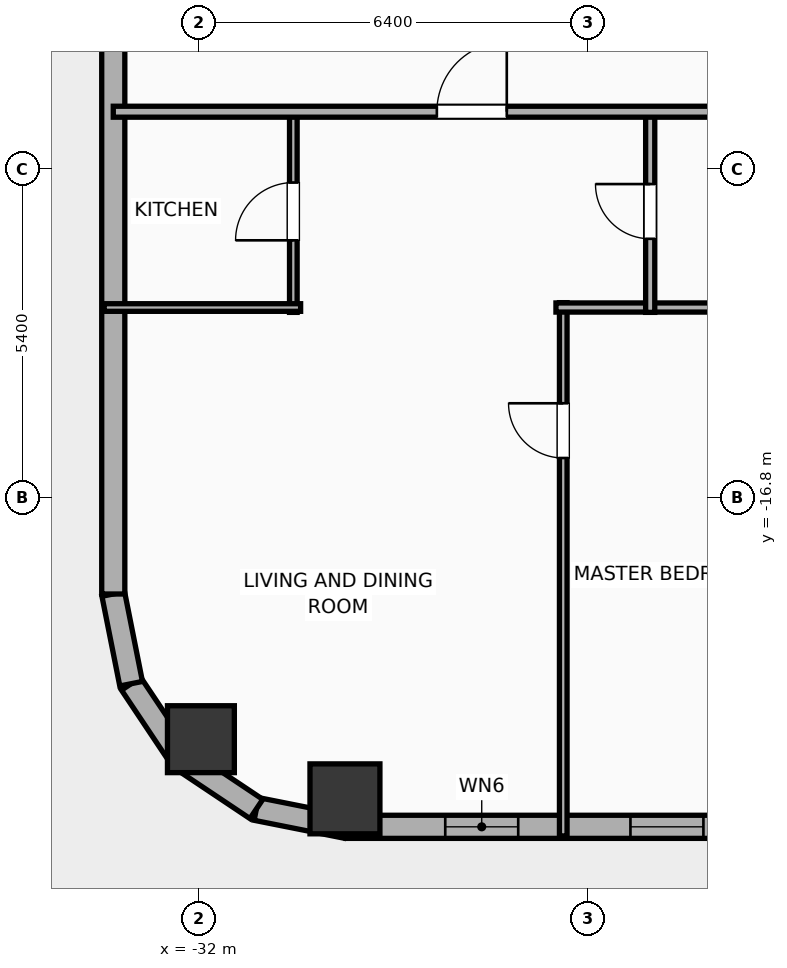
"""IFC4 building model, lengths in metres.
Left out: names, types, materials, properties, quantities, classifications, styles, units other than length and angle.
Written with IfcOpenShell. Run it as: python <this file> out.ifc"""

import sys

from ifc_helpers import new_model, si_unit, direction, frame, frame_2d, origin, origin_2d, place, context, subcontext, project, spatial, rectangle, hollow_rectangle, hollow_circle, extrude, element, fill, save


model = new_model("IFC4")
c1 = context("Model", 3, precision=1e-05, world=origin(), true_north=direction((0.0, 1.0)))
c2 = subcontext(c1, "Body", "Model", "MODEL_VIEW")
j1 = project(units=[si_unit("LENGTHUNIT", "METRE"), si_unit("PLANEANGLEUNIT", "RADIAN")], contexts=[c1])
p1 = place(None, origin())
s1 = spatial("IfcSite", under=j1, at=p1, CompositionType="ELEMENT")
p2 = place(p1, origin())
s2 = spatial("IfcBuilding", under=s1, at=p2, CompositionType="ELEMENT")
p3 = place(p2, frame((0.0, 0.0, 26.0)))
s3 = spatial("IfcBuildingStorey", under=s2, at=p3, CompositionType="ELEMENT", Elevation=26.0)
p4 = place(p3, frame((-29.6, -21.75, -0.25), z_axis=(0.0, 0.0, 1.0), x_axis=(1.0, 0.0, 0.0)))
e1 = element("IfcColumn", 1, at=p4, inside=s3, PredefinedType="COLUMN", context=c2, shape_type="SweptSolid", body=[
    extrude(hollow_rectangle(XDim=1.15, YDim=1.15, WallThickness=0.04, at=origin_2d()), origin(), (0.0, 0.0, 1.0), 4.15),
])
p5 = place(p3, frame((-31.969, -20.769, -0.25), z_axis=(0.0, 0.0, 1.0), x_axis=(1.0, 0.0, 0.0)))
e2 = element("IfcColumn", 2, at=p5, inside=s3, PredefinedType="COLUMN", context=c2, shape_type="SweptSolid", body=[
    extrude(hollow_circle(Radius=0.55, WallThickness=0.036, at=origin_2d()), origin(), (0.0, 0.0, 1.0), 4.15),
])
p6 = place(p3, frame((22.381, -22.21, 0.0), z_axis=(0.0, 0.0, 1.0), x_axis=(-1.0, 0.0, 0.0)))
e3 = element("IfcWall", 3, at=p6, inside=s3, PredefinedType="ELEMENTEDWALL", context=c2, shape_type="SweptSolid", body=[
    extrude(rectangle(XDim=51.963, YDim=0.38, at=frame_2d((25.981, 0.0))), origin(), (0.0, 0.0, 1.0), 2.54),
])
p7 = place(p6, frame((25.231, 0.0, 0.0)))
e4 = element("IfcOpeningElement", 4, at=p7, cuts=e3, PredefinedType="OPENING", context=c2, shape_type="SweptSolid", body=[
    extrude(rectangle(XDim=1.5, YDim=2.05, at=frame_2d((0.75, 1.025))), frame((0.0, 0.2, 0.0), z_axis=(0.0, -1.0, 0.0), x_axis=(1.0, 0.0, 0.0)), (0.0, 0.0, 1.0), 0.4),
])
p8 = place(p6, frame((6.61, 0.0, 0.75)))
e5 = element("IfcOpeningElement", 5, at=p8, cuts=e3, PredefinedType="OPENING", context=c2, shape_type="SweptSolid", body=[
    extrude(rectangle(XDim=2.4, YDim=1.63, at=frame_2d((1.2, 0.815))), frame((0.0, 0.2, 0.0), z_axis=(0.0, -1.0, 0.0), x_axis=(1.0, 0.0, 0.0)), (0.0, 0.0, 1.0), 0.4),
])
p9 = place(p6, frame((49.132, 0.0, 0.75)))
e6 = element("IfcOpeningElement", 6, at=p9, cuts=e3, PredefinedType="OPENING", context=c2, shape_type="SweptSolid", body=[
    extrude(rectangle(XDim=1.2, YDim=1.63, at=frame_2d((0.6, 0.815))), frame((0.0, 0.2, 0.0), z_axis=(0.0, -1.0, 0.0), x_axis=(1.0, 0.0, 0.0)), (0.0, 0.0, 1.0), 0.4),
])
p10 = place(p6, frame((46.086, 0.0, 0.75)))
e7 = element("IfcOpeningElement", 7, at=p10, cuts=e3, PredefinedType="OPENING", context=c2, shape_type="SweptSolid", body=[
    extrude(rectangle(XDim=1.2, YDim=1.63, at=frame_2d((0.6, 0.815))), frame((0.0, 0.2, 0.0), z_axis=(0.0, -1.0, 0.0), x_axis=(1.0, 0.0, 0.0)), (0.0, 0.0, 1.0), 0.4),
])
p11 = place(p6, frame((42.426, 0.0, 0.75)))
e8 = element("IfcOpeningElement", 8, at=p11, cuts=e3, PredefinedType="OPENING", context=c2, shape_type="SweptSolid", body=[
    extrude(rectangle(XDim=1.2, YDim=1.63, at=frame_2d((0.6, 0.815))), frame((0.0, 0.2, 0.0), z_axis=(0.0, -1.0, 0.0), x_axis=(1.0, 0.0, 0.0)), (0.0, 0.0, 1.0), 0.4),
])
p12 = place(p6, frame((38.286, 0.0, 0.75)))
e9 = element("IfcOpeningElement", 9, at=p12, cuts=e3, PredefinedType="OPENING", context=c2, shape_type="SweptSolid", body=[
    extrude(rectangle(XDim=1.2, YDim=1.63, at=frame_2d((0.6, 0.815))), frame((0.0, 0.2, 0.0), z_axis=(0.0, -1.0, 0.0), x_axis=(1.0, 0.0, 0.0)), (0.0, 0.0, 1.0), 0.4),
])
p13 = place(p6, frame((35.219, 0.0, 0.75)))
e10 = element("IfcOpeningElement", 10, at=p13, cuts=e3, PredefinedType="OPENING", context=c2, shape_type="SweptSolid", body=[
    extrude(rectangle(XDim=1.2, YDim=1.63, at=frame_2d((0.6, 0.815))), frame((0.0, 0.2, 0.0), z_axis=(0.0, -1.0, 0.0), x_axis=(1.0, 0.0, 0.0)), (0.0, 0.0, 1.0), 0.4),
])
p14 = place(p6, frame((32.039, 0.0, 0.75)))
e11 = element("IfcOpeningElement", 11, at=p14, cuts=e3, PredefinedType="OPENING", context=c2, shape_type="SweptSolid", body=[
    extrude(rectangle(XDim=1.2, YDim=1.63, at=frame_2d((0.6, 0.815))), frame((0.0, 0.2, 0.0), z_axis=(0.0, -1.0, 0.0), x_axis=(1.0, 0.0, 0.0)), (0.0, 0.0, 1.0), 0.4),
])
p15 = place(p6, frame((22.686, 0.0, 0.75)))
e12 = element("IfcOpeningElement", 12, at=p15, cuts=e3, PredefinedType="OPENING", context=c2, shape_type="SweptSolid", body=[
    extrude(rectangle(XDim=1.2, YDim=1.63, at=frame_2d((0.6, 0.815))), frame((0.0, 0.2, 0.0), z_axis=(0.0, -1.0, 0.0), x_axis=(1.0, 0.0, 0.0)), (0.0, 0.0, 1.0), 0.4),
])
p16 = place(p6, frame((18.786, 0.0, 0.75)))
e13 = element("IfcOpeningElement", 13, at=p16, cuts=e3, PredefinedType="OPENING", context=c2, shape_type="SweptSolid", body=[
    extrude(rectangle(XDim=1.2, YDim=1.63, at=frame_2d((0.6, 0.815))), frame((0.0, 0.2, 0.0), z_axis=(0.0, -1.0, 0.0), x_axis=(1.0, 0.0, 0.0)), (0.0, 0.0, 1.0), 0.4),
])
p17 = place(p6, frame((14.886, 0.0, 0.75)))
e14 = element("IfcOpeningElement", 14, at=p17, cuts=e3, PredefinedType="OPENING", context=c2, shape_type="SweptSolid", body=[
    extrude(rectangle(XDim=1.2, YDim=1.63, at=frame_2d((0.6, 0.815))), frame((0.0, 0.2, 0.0), z_axis=(0.0, -1.0, 0.0), x_axis=(1.0, 0.0, 0.0)), (0.0, 0.0, 1.0), 0.4),
])
p18 = place(p6, frame((11.826, 0.0, 0.75)))
e15 = element("IfcOpeningElement", 15, at=p18, cuts=e3, PredefinedType="OPENING", context=c2, shape_type="SweptSolid", body=[
    extrude(rectangle(XDim=1.2, YDim=1.63, at=frame_2d((0.6, 0.815))), frame((0.0, 0.2, 0.0), z_axis=(0.0, -1.0, 0.0), x_axis=(1.0, 0.0, 0.0)), (0.0, 0.0, 1.0), 0.4),
])
p19 = place(p6, frame((2.836, 0.0, 0.75)))
e16 = element("IfcOpeningElement", 16, at=p19, cuts=e3, PredefinedType="OPENING", context=c2, shape_type="SweptSolid", body=[
    extrude(rectangle(XDim=1.2, YDim=1.63, at=frame_2d((0.6, 0.815))), frame((0.0, 0.2, 0.0), z_axis=(0.0, -1.0, 0.0), x_axis=(1.0, 0.0, 0.0)), (0.0, 0.0, 1.0), 0.4),
])
p20 = place(p3, frame((-29.581, -22.21, 0.0), z_axis=(0.0, 0.0, 1.0), x_axis=(-0.980786132421, 0.195086038585, 0.0)))
e17 = element("IfcWall", 17, at=p20, inside=s3, PredefinedType="ELEMENTEDWALL", context=c2, shape_type="SweptSolid", body=[
    extrude(rectangle(XDim=1.504, YDim=0.38, at=frame_2d((0.752, 0.0))), origin(), (0.0, 0.0, 1.0), 2.54),
])
p21 = place(p3, frame((-31.057, -21.917, 0.0), z_axis=(0.0, 0.0, 1.0), x_axis=(-0.831442848281, 0.555610286119, 0.0)))
e18 = element("IfcWall", 18, at=p21, inside=s3, PredefinedType="ELEMENTEDWALL", context=c2, shape_type="SweptSolid", body=[
    extrude(rectangle(XDim=1.485, YDim=0.38, at=frame_2d((0.743, 0.0))), origin(), (0.0, 0.0, 1.0), 2.54),
])
p22 = place(p3, frame((-32.292, -21.091, 0.0), z_axis=(0.0, 0.0, 1.0), x_axis=(-0.555572577804, 0.831468045563, 0.0)))
e19 = element("IfcWall", 19, at=p22, inside=s3, PredefinedType="ELEMENTEDWALL", context=c2, shape_type="SweptSolid", body=[
    extrude(rectangle(XDim=1.485, YDim=0.38, at=frame_2d((0.742, 0.0))), origin(), (0.0, 0.0, 1.0), 3.65),
])
p23 = place(p3, frame((-33.116, -19.857, 0.0), z_axis=(0.0, 0.0, 1.0), x_axis=(-0.195086038585, 0.980786132421, 0.0)))
e20 = element("IfcWall", 20, at=p23, inside=s3, PredefinedType="ELEMENTEDWALL", context=c2, shape_type="SweptSolid", body=[
    extrude(rectangle(XDim=1.504, YDim=0.38, at=frame_2d((0.752, 0.0))), origin(), (0.0, 0.0, 1.0), 3.65),
])
p24 = place(p3, frame((-33.41, -18.381, 0.0), z_axis=(0.0, 0.0, 1.0), x_axis=(0.0, 1.0, 0.0)))
e21 = element("IfcWall", 21, at=p24, inside=s3, PredefinedType="ELEMENTEDWALL", context=c2, shape_type="SweptSolid", body=[
    extrude(rectangle(XDim=36.763, YDim=0.38, at=frame_2d((18.381, 0.0))), origin(), (0.0, 0.0, 1.0), 2.54),
])
p25 = place(p24, frame((33.362, 0.0, 0.75)))
e22 = element("IfcOpeningElement", 22, at=p25, cuts=e21, PredefinedType="OPENING", context=c2, shape_type="SweptSolid", body=[
    extrude(rectangle(XDim=1.2, YDim=1.63, at=frame_2d((0.6, 0.815))), frame((0.0, 0.2, 0.0), z_axis=(0.0, -1.0, 0.0), x_axis=(1.0, 0.0, 0.0)), (0.0, 0.0, 1.0), 0.4),
])
p26 = place(p24, frame((22.301, 0.0, 0.75)))
e23 = element("IfcOpeningElement", 23, at=p26, cuts=e21, PredefinedType="OPENING", context=c2, shape_type="SweptSolid", body=[
    extrude(rectangle(XDim=1.2, YDim=1.63, at=frame_2d((0.6, 0.815))), frame((0.0, 0.2, 0.0), z_axis=(0.0, -1.0, 0.0), x_axis=(1.0, 0.0, 0.0)), (0.0, 0.0, 1.0), 0.4),
])
p27 = place(p24, frame((13.401, 0.0, 0.75)))
e24 = element("IfcOpeningElement", 24, at=p27, cuts=e21, PredefinedType="OPENING", context=c2, shape_type="SweptSolid", body=[
    extrude(rectangle(XDim=1.2, YDim=1.63, at=frame_2d((0.6, 0.815))), frame((0.0, 0.2, 0.0), z_axis=(0.0, -1.0, 0.0), x_axis=(1.0, 0.0, 0.0)), (0.0, 0.0, 1.0), 0.4),
])
p28 = place(p3, frame((-26.01, -22.36, 0.0), z_axis=(0.0, 0.0, 1.0), x_axis=(0.0, 1.0, 0.0)))
e25 = element("IfcWall", 25, at=p28, inside=s3, PredefinedType="PARTITIONING", context=c2, shape_type="SweptSolid", body=[
    extrude(rectangle(XDim=8.77, YDim=0.125, at=frame_2d((4.385, 0.0))), origin(), (0.0, 0.0, 1.0), 3.65),
])
p29 = place(p28, frame((6.215, 0.0, 0.0)))
e26 = element("IfcOpeningElement", 26, at=p29, cuts=e25, PredefinedType="OPENING", context=c2, shape_type="SweptSolid", body=[
    extrude(rectangle(XDim=0.9, YDim=2.05, at=frame_2d((0.45, 1.025))), frame((0.0, 0.073, 0.0), z_axis=(0.0, -1.0, 0.0), x_axis=(1.0, 0.0, 0.0)), (0.0, 0.0, 1.0), 0.145),
])
p30 = place(p3, frame((-26.13, -13.67, 0.0), z_axis=(0.0, 0.0, 1.0), x_axis=(1.0, 0.0, 0.0)))
e27 = element("IfcWall", 27, at=p30, inside=s3, PredefinedType="PLUMBINGWALL", context=c2, shape_type="SweptSolid", body=[
    extrude(rectangle(XDim=3.605, YDim=0.15, at=frame_2d((1.802, 0.0))), origin(), (0.0, 0.0, 1.0), 3.65),
])
p31 = place(p3, frame((-30.449, -13.75, 0.0), z_axis=(0.0, 0.0, 1.0), x_axis=(0.0, 1.0, 0.0)))
e28 = element("IfcWall", 28, at=p31, inside=s3, PredefinedType="PARTITIONING", context=c2, shape_type="SweptSolid", body=[
    extrude(rectangle(XDim=3.32, YDim=0.125, at=frame_2d((1.66, 0.0))), origin(), (0.0, 0.0, 1.0), 3.65),
])
p32 = place(p31, frame((1.185, 0.0, 0.0)))
e29 = element("IfcOpeningElement", 29, at=p32, cuts=e28, PredefinedType="OPENING", context=c2, shape_type="SweptSolid", body=[
    extrude(rectangle(XDim=0.95, YDim=2.05, at=frame_2d((0.475, 1.025))), frame((0.0, 0.073, 0.0), z_axis=(0.0, -1.0, 0.0), x_axis=(1.0, 0.0, 0.0)), (0.0, 0.0, 1.0), 0.145),
])
p33 = place(p3, frame((-33.56, -13.67, 0.0), z_axis=(0.0, 0.0, 1.0), x_axis=(1.0, 0.0, 0.0)))
e30 = element("IfcWall", 30, at=p33, inside=s3, PredefinedType="PARTITIONING", context=c2, shape_type="SweptSolid", body=[
    extrude(rectangle(XDim=3.231, YDim=0.125, at=frame_2d((1.615, 0.0))), origin(), (0.0, 0.0, 1.0), 3.65),
])
p34 = place(p3, frame((-24.58, -13.75, 0.0), z_axis=(0.0, 0.0, 1.0), x_axis=(0.0, 1.0, 0.0)))
e31 = element("IfcWall", 31, at=p34, inside=s3, PredefinedType="PLUMBINGWALL", context=c2, shape_type="SweptSolid", body=[
    extrude(rectangle(XDim=3.32, YDim=0.15, at=frame_2d((1.66, 0.0))), origin(), (0.0, 0.0, 1.0), 3.65),
])
p35 = place(p34, frame((1.21, 0.0, 0.0)))
e32 = element("IfcOpeningElement", 32, at=p35, cuts=e31, PredefinedType="OPENING", context=c2, shape_type="SweptSolid", body=[
    extrude(rectangle(XDim=0.9, YDim=2.05, at=frame_2d((0.45, 1.025))), frame((0.0, 0.085, 0.0), z_axis=(0.0, -1.0, 0.0), x_axis=(1.0, 0.0, 0.0)), (0.0, 0.0, 1.0), 0.17),
])
p36 = place(p3, frame((-33.41, -10.45, 0.0), z_axis=(0.0, 0.0, 1.0), x_axis=(1.0, 0.0, 0.0)))
e33 = element("IfcWall", 33, at=p36, inside=s3, PredefinedType="PARTITIONING", context=c2, shape_type="SweptSolid", body=[
    extrude(rectangle(XDim=59.62, YDim=0.18, at=frame_2d((29.81, 0.0))), origin(), (0.0, 0.0, 1.0), 3.65),
])
p37 = place(p36, frame((5.321, 0.0, 0.0)))
e34 = element("IfcOpeningElement", 34, at=p37, cuts=e33, PredefinedType="OPENING", context=c2, shape_type="SweptSolid", body=[
    extrude(rectangle(XDim=1.15, YDim=2.05, at=frame_2d((0.575, 1.025))), frame((0.0, 0.1, 0.0), z_axis=(0.0, -1.0, 0.0), x_axis=(1.0, 0.0, 0.0)), (0.0, 0.0, 1.0), 0.2),
])
p38 = place(p36, frame((14.3, 0.0, 0.0)))
e35 = element("IfcOpeningElement", 35, at=p38, cuts=e33, PredefinedType="OPENING", context=c2, shape_type="SweptSolid", body=[
    extrude(rectangle(XDim=1.15, YDim=2.05, at=frame_2d((0.575, 1.025))), frame((0.0, 0.1, 0.0), z_axis=(0.0, -1.0, 0.0), x_axis=(1.0, 0.0, 0.0)), (0.0, 0.0, 1.0), 0.2),
])
p39 = place(p36, frame((22.265, 0.0, 0.0)))
e36 = element("IfcOpeningElement", 36, at=p39, cuts=e33, PredefinedType="OPENING", context=c2, shape_type="SweptSolid", body=[
    extrude(rectangle(XDim=0.9, YDim=2.05, at=frame_2d((0.45, 1.025))), frame((0.0, 0.1, 0.0), z_axis=(0.0, -1.0, 0.0), x_axis=(1.0, 0.0, 0.0)), (0.0, 0.0, 1.0), 0.2),
])
p40 = place(p36, frame((29.903, 0.0, 0.0)))
e37 = element("IfcOpeningElement", 37, at=p40, cuts=e33, PredefinedType="OPENING", context=c2, shape_type="SweptSolid", body=[
    extrude(rectangle(XDim=1.15, YDim=2.05, at=frame_2d((0.575, 1.025))), frame((0.0, 0.1, 0.0), z_axis=(0.0, -1.0, 0.0), x_axis=(1.0, 0.0, 0.0)), (0.0, 0.0, 1.0), 0.2),
])
p41 = place(p36, frame((37.701, 0.0, 0.0)))
e38 = element("IfcOpeningElement", 38, at=p41, cuts=e33, PredefinedType="OPENING", context=c2, shape_type="SweptSolid", body=[
    extrude(rectangle(XDim=1.15, YDim=2.05, at=frame_2d((0.575, 1.025))), frame((0.0, 0.1, 0.0), z_axis=(0.0, -1.0, 0.0), x_axis=(1.0, 0.0, 0.0)), (0.0, 0.0, 1.0), 0.2),
])
p42 = place(p36, frame((45.654, 0.0, 0.0)))
e39 = element("IfcOpeningElement", 39, at=p42, cuts=e33, PredefinedType="OPENING", context=c2, shape_type="SweptSolid", body=[
    extrude(rectangle(XDim=0.9, YDim=2.05, at=frame_2d((0.45, 1.025))), frame((0.0, 0.1, 0.0), z_axis=(0.0, -1.0, 0.0), x_axis=(1.0, 0.0, 0.0)), (0.0, 0.0, 1.0), 0.2),
])
p43 = place(p36, frame((54.472, 0.0, 0.0)))
e40 = element("IfcOpeningElement", 40, at=p43, cuts=e33, PredefinedType="OPENING", context=c2, shape_type="SweptSolid", body=[
    extrude(rectangle(XDim=1.15, YDim=2.05, at=frame_2d((0.575, 1.025))), frame((0.0, 0.1, 0.0), z_axis=(0.0, -1.0, 0.0), x_axis=(1.0, 0.0, 0.0)), (0.0, 0.0, 1.0), 0.2),
])
p44 = place(p9, origin())
e41 = element("IfcWindow", 41, at=p44, inside=s3, PartitioningType="SINGLE_PANEL", PredefinedType="WINDOW", context=c2, shape_type="SweptSolid", body=[
    extrude(rectangle(XDim=1.2, YDim=1.63, at=frame_2d((0.6, 0.815))), frame((0.0, 0.03, 0.0), z_axis=(0.0, -1.0, 0.0), x_axis=(1.0, 0.0, 0.0)), (0.0, 0.0, 1.0), 0.06),
])
fill(e6, e41)
p45 = place(p10, origin())
e42 = element("IfcWindow", 42, at=p45, inside=s3, PartitioningType="SINGLE_PANEL", PredefinedType="WINDOW", context=c2, shape_type="SweptSolid", body=[
    extrude(rectangle(XDim=1.2, YDim=1.63, at=frame_2d((0.6, 0.815))), frame((0.0, 0.03, 0.0), z_axis=(0.0, -1.0, 0.0), x_axis=(1.0, 0.0, 0.0)), (0.0, 0.0, 1.0), 0.06),
])
fill(e7, e42)
p46 = place(p29, origin())
e43 = element("IfcDoor", 43, at=p46, inside=s3, OperationType="SINGLE_SWING_RIGHT", PredefinedType="DOOR", context=c2, shape_type="SweptSolid", body=[
    extrude(rectangle(XDim=0.9, YDim=2.05, at=frame_2d((0.45, 1.025))), frame((0.0, 0.025, 0.0), z_axis=(0.0, -1.0, 0.0), x_axis=(1.0, 0.0, 0.0)), (0.0, 0.0, 1.0), 0.05),
])
fill(e26, e43)
p47 = place(p32, origin())
e44 = element("IfcDoor", 44, at=p47, inside=s3, OperationType="SINGLE_SWING_LEFT", PredefinedType="DOOR", context=c2, shape_type="SweptSolid", body=[
    extrude(rectangle(XDim=0.95, YDim=2.05, at=frame_2d((0.475, 1.025))), frame((0.0, 0.025, 0.0), z_axis=(0.0, -1.0, 0.0), x_axis=(1.0, 0.0, 0.0)), (0.0, 0.0, 1.0), 0.05),
])
fill(e29, e44)
p48 = place(p35, origin())
e45 = element("IfcDoor", 45, at=p48, inside=s3, OperationType="SINGLE_SWING_RIGHT", PredefinedType="DOOR", context=c2, shape_type="SweptSolid", body=[
    extrude(rectangle(XDim=0.9, YDim=2.05, at=frame_2d((0.45, 1.025))), frame((0.0, 0.025, 0.0), z_axis=(0.0, -1.0, 0.0), x_axis=(1.0, 0.0, 0.0)), (0.0, 0.0, 1.0), 0.05),
])
fill(e32, e45)
p49 = place(p37, origin())
e46 = element("IfcDoor", 46, at=p49, inside=s3, OperationType="SINGLE_SWING_RIGHT", PredefinedType="DOOR", context=c2, shape_type="SweptSolid", body=[
    extrude(rectangle(XDim=1.15, YDim=2.05, at=frame_2d((0.575, 1.025))), frame((0.0, 0.025, 0.0), z_axis=(0.0, -1.0, 0.0), x_axis=(1.0, 0.0, 0.0)), (0.0, 0.0, 1.0), 0.05),
])
fill(e34, e46)
save(model, sys.argv[1])
